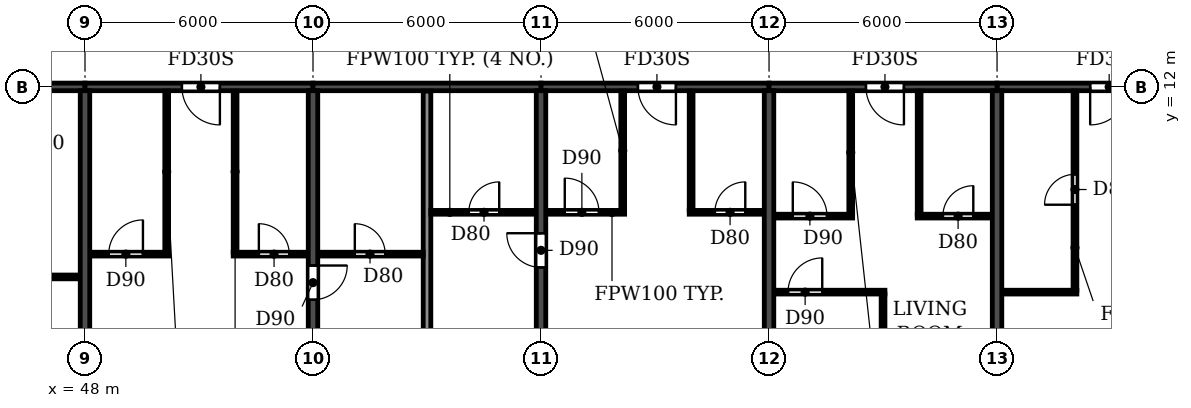
"""IFC4 building model, lengths in metres.
Left out: names, types, materials, properties, quantities, classifications, styles, units other than length and angle.
Written with IfcOpenShell. Run it as: python <this file> out.ifc"""

import sys

from ifc_helpers import new_model, si_unit, direction, frame, frame_2d, origin, place, context, subcontext, project, spatial, rectangle, extrude, element, fill, save


model = new_model("IFC4")
c1 = context("Model", 3, precision=1e-05, world=origin(), true_north=direction((0.0, 1.0)))
c2 = subcontext(c1, "Body", "Model", "MODEL_VIEW")
j1 = project(units=[si_unit("LENGTHUNIT", "METRE"), si_unit("PLANEANGLEUNIT", "RADIAN")], contexts=[c1])
p1 = place(None, origin())
s1 = spatial("IfcSite", under=j1, at=p1, CompositionType="ELEMENT")
p2 = place(p1, origin())
s2 = spatial("IfcBuilding", under=s1, at=p2, CompositionType="ELEMENT")
p3 = place(p2, frame((0.0, 0.0, 251.1)))
s3 = spatial("IfcBuildingStorey", under=s2, at=p3, CompositionType="ELEMENT", Elevation=251.1)
p4 = place(p3, frame((48.0, 0.2, 0.0), z_axis=(0.0, 0.0, 1.0), x_axis=(0.0, 1.0, 0.0)))
e1 = element("IfcWall", 1, at=p4, inside=s3, PredefinedType="SHEAR", context=c2, shape_type="SweptSolid", body=[
    extrude(rectangle(XDim=11.7, YDim=0.25, at=frame_2d((5.85, 0.0))), origin(), (0.0, 0.0, 1.0), 3.08),
])
p5 = place(p3, frame((54.0, 0.2, 0.0), z_axis=(0.0, 0.0, 1.0), x_axis=(0.0, 1.0, 0.0)))
e2 = element("IfcWall", 2, at=p5, inside=s3, PredefinedType="SHEAR", context=c2, shape_type="SweptSolid", body=[
    extrude(rectangle(XDim=11.7, YDim=0.25, at=frame_2d((5.85, 0.0))), origin(), (0.0, 0.0, 1.0), 3.08),
])
p6 = place(p5, frame((6.2, 0.0, 0.0)))
e3 = element("IfcOpeningElement", 3, at=p6, cuts=e2, PredefinedType="OPENING", context=c2, shape_type="SweptSolid", body=[
    extrude(rectangle(XDim=0.9, YDim=2.1, at=frame_2d((0.45, 1.05))), frame((0.0, 0.135, 0.0), z_axis=(0.0, -1.0, 0.0), x_axis=(1.0, 0.0, 0.0)), (0.0, 0.0, 1.0), 0.27),
])
p7 = place(p3, frame((60.0, 0.2, 0.0), z_axis=(0.0, 0.0, 1.0), x_axis=(0.0, 1.0, 0.0)))
e4 = element("IfcWall", 4, at=p7, inside=s3, PredefinedType="SHEAR", context=c2, shape_type="SweptSolid", body=[
    extrude(rectangle(XDim=11.7, YDim=0.25, at=frame_2d((5.85, 0.0))), origin(), (0.0, 0.0, 1.0), 3.08),
])
p8 = place(p7, frame((7.05, 0.0, 0.0)))
e5 = element("IfcOpeningElement", 5, at=p8, cuts=e4, PredefinedType="OPENING", context=c2, shape_type="SweptSolid", body=[
    extrude(rectangle(XDim=0.9, YDim=2.1, at=frame_2d((0.45, 1.05))), frame((0.0, 0.135, 0.0), z_axis=(0.0, -1.0, 0.0), x_axis=(1.0, 0.0, 0.0)), (0.0, 0.0, 1.0), 0.27),
])
for number, where, z_axis, x_axis in (
    (6, (66.0, 0.2, 0.0), (0.0, 0.0, 1.0), (0.0, 1.0, 0.0)),
    (7, (72.0, 0.2, 0.0), (0.0, 0.0, 1.0), (0.0, 1.0, 0.0)),
):
    element("IfcWall", number, at=place(p3, frame(where, z_axis=z_axis, x_axis=x_axis)), inside=s3, PredefinedType="SHEAR", context=c2, shape_type="SweptSolid", body=[
        extrude(rectangle(XDim=11.7, YDim=0.25, at=frame_2d((5.85, 0.0))), origin(), (0.0, 0.0, 1.0), 3.08),
    ])
p9 = place(p3, frame((42.0, 12.0, 0.0), z_axis=(0.0, 0.0, 1.0), x_axis=(1.0, 0.0, 0.0)))
e8 = element("IfcWall", 8, at=p9, inside=s3, PredefinedType="SHEAR", context=c2, shape_type="SweptSolid", body=[
    extrude(rectangle(XDim=6.0, YDim=0.2, at=frame_2d((3.0, 0.0))), origin(), (0.0, 0.0, 1.0), 2.48),
])
p10 = place(p9, frame((2.55, 0.0, 0.0)))
e9 = element("IfcOpeningElement", 9, at=p10, cuts=e8, PredefinedType="OPENING", context=c2, shape_type="SweptSolid", body=[
    extrude(rectangle(XDim=1.0, YDim=2.1, at=frame_2d((0.5, 1.05))), frame((0.0, 0.11, 0.0), z_axis=(0.0, -1.0, 0.0), x_axis=(1.0, 0.0, 0.0)), (0.0, 0.0, 1.0), 0.22),
])
p11 = place(p3, frame((48.0, 12.0, 0.0), z_axis=(0.0, 0.0, 1.0), x_axis=(1.0, 0.0, 0.0)))
e10 = element("IfcWall", 10, at=p11, inside=s3, PredefinedType="SHEAR", context=c2, shape_type="SweptSolid", body=[
    extrude(rectangle(XDim=6.0, YDim=0.2, at=frame_2d((3.0, 0.0))), origin(), (0.0, 0.0, 1.0), 2.48),
])
p12 = place(p11, frame((2.55, 0.0, 0.0)))
e11 = element("IfcOpeningElement", 11, at=p12, cuts=e10, PredefinedType="OPENING", context=c2, shape_type="SweptSolid", body=[
    extrude(rectangle(XDim=1.0, YDim=2.1, at=frame_2d((0.5, 1.05))), frame((0.0, 0.11, 0.0), z_axis=(0.0, -1.0, 0.0), x_axis=(1.0, 0.0, 0.0)), (0.0, 0.0, 1.0), 0.22),
])
p13 = place(p3, frame((54.0, 12.0, 0.0), z_axis=(0.0, 0.0, 1.0), x_axis=(1.0, 0.0, 0.0)))
e12 = element("IfcWall", 12, at=p13, inside=s3, PredefinedType="SHEAR", context=c2, shape_type="SweptSolid", body=[
    extrude(rectangle(XDim=6.0, YDim=0.2, at=frame_2d((3.0, 0.0))), origin(), (0.0, 0.0, 1.0), 2.48),
])
p14 = place(p3, frame((60.0, 12.0, 0.0), z_axis=(0.0, 0.0, 1.0), x_axis=(1.0, 0.0, 0.0)))
e13 = element("IfcWall", 13, at=p14, inside=s3, PredefinedType="SHEAR", context=c2, shape_type="SweptSolid", body=[
    extrude(rectangle(XDim=6.0, YDim=0.2, at=frame_2d((3.0, 0.0))), origin(), (0.0, 0.0, 1.0), 2.48),
])
p15 = place(p14, frame((2.55, 0.0, 0.0)))
e14 = element("IfcOpeningElement", 14, at=p15, cuts=e13, PredefinedType="OPENING", context=c2, shape_type="SweptSolid", body=[
    extrude(rectangle(XDim=1.0, YDim=2.1, at=frame_2d((0.5, 1.05))), frame((0.0, 0.11, 0.0), z_axis=(0.0, -1.0, 0.0), x_axis=(1.0, 0.0, 0.0)), (0.0, 0.0, 1.0), 0.22),
])
p16 = place(p3, frame((66.0, 12.0, 0.0), z_axis=(0.0, 0.0, 1.0), x_axis=(1.0, 0.0, 0.0)))
e15 = element("IfcWall", 15, at=p16, inside=s3, PredefinedType="SHEAR", context=c2, shape_type="SweptSolid", body=[
    extrude(rectangle(XDim=6.0, YDim=0.2, at=frame_2d((3.0, 0.0))), origin(), (0.0, 0.0, 1.0), 2.48),
])
p17 = place(p16, frame((2.55, 0.0, 0.0)))
e16 = element("IfcOpeningElement", 16, at=p17, cuts=e15, PredefinedType="OPENING", context=c2, shape_type="SweptSolid", body=[
    extrude(rectangle(XDim=1.0, YDim=2.1, at=frame_2d((0.5, 1.05))), frame((0.0, 0.11, 0.0), z_axis=(0.0, -1.0, 0.0), x_axis=(1.0, 0.0, 0.0)), (0.0, 0.0, 1.0), 0.22),
])
p18 = place(p3, frame((72.0, 12.0, 0.0), z_axis=(0.0, 0.0, 1.0), x_axis=(1.0, 0.0, 0.0)))
e17 = element("IfcWall", 17, at=p18, inside=s3, PredefinedType="SHEAR", context=c2, shape_type="SweptSolid", body=[
    extrude(rectangle(XDim=6.0, YDim=0.2, at=frame_2d((3.0, 0.0))), origin(), (0.0, 0.0, 1.0), 2.48),
])
p19 = place(p18, frame((2.45, 0.0, 0.0)))
e18 = element("IfcOpeningElement", 18, at=p19, cuts=e17, PredefinedType="OPENING", context=c2, shape_type="SweptSolid", body=[
    extrude(rectangle(XDim=1.0, YDim=2.1, at=frame_2d((0.5, 1.05))), frame((0.0, 0.11, 0.0), z_axis=(0.0, -1.0, 0.0), x_axis=(1.0, 0.0, 0.0)), (0.0, 0.0, 1.0), 0.22),
])
p20 = place(p3, frame((57.0, 0.06, 0.0), z_axis=(0.0, 0.0, 1.0), x_axis=(0.0, 1.0, 0.0)))
e19 = element("IfcWall", 19, at=p20, inside=s3, PredefinedType="PARTITIONING", context=c2, shape_type="SweptSolid", body=[
    extrude(rectangle(XDim=11.83, YDim=0.2, at=frame_2d((5.915, 0.0))), origin(), (0.0, 0.0, 1.0), 3.08),
])
p21 = place(p3, frame((66.135, 6.6, 0.0), z_axis=(0.0, 0.0, 1.0), x_axis=(1.0, 0.0, 0.0)))
e20 = element("IfcWall", 20, at=p21, inside=s3, PredefinedType="PARTITIONING", context=c2, shape_type="SweptSolid", body=[
    extrude(rectangle(XDim=2.915, YDim=0.1, at=frame_2d((1.458, 0.0))), origin(), (0.0, 0.0, 1.0), 3.08),
])
p22 = place(p21, frame((0.365, 0.0, 0.0)))
e21 = element("IfcOpeningElement", 21, at=p22, cuts=e20, PredefinedType="OPENING", context=c2, shape_type="SweptSolid", body=[
    extrude(rectangle(XDim=0.9, YDim=2.1, at=frame_2d((0.45, 1.05))), frame((0.0, 0.06, 0.0), z_axis=(0.0, -1.0, 0.0), x_axis=(1.0, 0.0, 0.0)), (0.0, 0.0, 1.0), 0.12),
])
for number, where, z_axis, x_axis in (
    (22, (72.135, 6.6, 0.0), (0.0, 0.0, 1.0), (1.0, 0.0, 0.0)),
    (23, (45.9, 7.0, 0.0), (0.0, 0.0, 1.0), (1.0, 0.0, 0.0)),
):
    element("IfcWall", number, at=place(p3, frame(where, z_axis=z_axis, x_axis=x_axis)), inside=s3, PredefinedType="PARTITIONING", context=c2, shape_type="SweptSolid", body=[
        extrude(rectangle(XDim=1.965, YDim=0.1, at=frame_2d((0.982, 0.0))), origin(), (0.0, 0.0, 1.0), 3.08),
    ])
p23 = place(p3, frame((48.135, 7.6, 0.0), z_axis=(0.0, 0.0, 1.0), x_axis=(1.0, 0.0, 0.0)))
e24 = element("IfcWall", 24, at=p23, inside=s3, PredefinedType="PARTITIONING", context=c2, shape_type="SweptSolid", body=[
    extrude(rectangle(XDim=2.065, YDim=0.1, at=frame_2d((1.032, 0.0))), origin(), (0.0, 0.0, 1.0), 3.08),
])
p24 = place(p23, frame((0.49, 0.0, 0.0)))
e25 = element("IfcOpeningElement", 25, at=p24, cuts=e24, PredefinedType="OPENING", context=c2, shape_type="SweptSolid", body=[
    extrude(rectangle(XDim=0.9, YDim=2.1, at=frame_2d((0.45, 1.05))), frame((0.0, 0.06, 0.0), z_axis=(0.0, -1.0, 0.0), x_axis=(1.0, 0.0, 0.0)), (0.0, 0.0, 1.0), 0.12),
])
p25 = place(p3, frame((51.9, 7.6, 0.0), z_axis=(0.0, 0.0, 1.0), x_axis=(1.0, 0.0, 0.0)))
e26 = element("IfcWall", 26, at=p25, inside=s3, PredefinedType="PARTITIONING", context=c2, shape_type="SweptSolid", body=[
    extrude(rectangle(XDim=1.965, YDim=0.1, at=frame_2d((0.982, 0.0))), origin(), (0.0, 0.0, 1.0), 3.08),
])
p26 = place(p25, frame((0.675, 0.0, 0.0)))
e27 = element("IfcOpeningElement", 27, at=p26, cuts=e26, PredefinedType="OPENING", context=c2, shape_type="SweptSolid", body=[
    extrude(rectangle(XDim=0.8, YDim=2.1, at=frame_2d((0.4, 1.05))), frame((0.0, 0.06, 0.0), z_axis=(0.0, -1.0, 0.0), x_axis=(1.0, 0.0, 0.0)), (0.0, 0.0, 1.0), 0.12),
])
p27 = place(p3, frame((54.135, 7.6, 0.0), z_axis=(0.0, 0.0, 1.0), x_axis=(1.0, 0.0, 0.0)))
e28 = element("IfcWall", 28, at=p27, inside=s3, PredefinedType="PARTITIONING", context=c2, shape_type="SweptSolid", body=[
    extrude(rectangle(XDim=2.765, YDim=0.1, at=frame_2d((1.382, 0.0))), origin(), (0.0, 0.0, 1.0), 3.08),
])
p28 = place(p27, frame((0.965, 0.0, 0.0)))
e29 = element("IfcOpeningElement", 29, at=p28, cuts=e28, PredefinedType="OPENING", context=c2, shape_type="SweptSolid", body=[
    extrude(rectangle(XDim=0.8, YDim=2.1, at=frame_2d((0.4, 1.05))), frame((0.0, 0.06, 0.0), z_axis=(0.0, -1.0, 0.0), x_axis=(1.0, 0.0, 0.0)), (0.0, 0.0, 1.0), 0.12),
])
p29 = place(p3, frame((66.135, 8.6, 0.0), z_axis=(0.0, 0.0, 1.0), x_axis=(1.0, 0.0, 0.0)))
e30 = element("IfcWall", 30, at=p29, inside=s3, PredefinedType="PARTITIONING", context=c2, shape_type="SweptSolid", body=[
    extrude(rectangle(XDim=2.065, YDim=0.1, at=frame_2d((1.032, 0.0))), origin(), (0.0, 0.0, 1.0), 3.08),
])
p30 = place(p29, frame((0.49, 0.0, 0.0)))
e31 = element("IfcOpeningElement", 31, at=p30, cuts=e30, PredefinedType="OPENING", context=c2, shape_type="SweptSolid", body=[
    extrude(rectangle(XDim=0.9, YDim=2.1, at=frame_2d((0.45, 1.05))), frame((0.0, 0.06, 0.0), z_axis=(0.0, -1.0, 0.0), x_axis=(1.0, 0.0, 0.0)), (0.0, 0.0, 1.0), 0.12),
])
p31 = place(p3, frame((69.9, 8.6, 0.0), z_axis=(0.0, 0.0, 1.0), x_axis=(1.0, 0.0, 0.0)))
e32 = element("IfcWall", 32, at=p31, inside=s3, PredefinedType="PARTITIONING", context=c2, shape_type="SweptSolid", body=[
    extrude(rectangle(XDim=1.965, YDim=0.1, at=frame_2d((0.982, 0.0))), origin(), (0.0, 0.0, 1.0), 3.08),
])
p32 = place(p31, frame((0.675, 0.0, 0.0)))
e33 = element("IfcOpeningElement", 33, at=p32, cuts=e32, PredefinedType="OPENING", context=c2, shape_type="SweptSolid", body=[
    extrude(rectangle(XDim=0.8, YDim=2.1, at=frame_2d((0.4, 1.05))), frame((0.0, 0.06, 0.0), z_axis=(0.0, -1.0, 0.0), x_axis=(1.0, 0.0, 0.0)), (0.0, 0.0, 1.0), 0.12),
])
p33 = place(p3, frame((57.1, 8.7, 0.0), z_axis=(0.0, 0.0, 1.0), x_axis=(1.0, 0.0, 0.0)))
e34 = element("IfcWall", 34, at=p33, inside=s3, PredefinedType="PARTITIONING", context=c2, shape_type="SweptSolid", body=[
    extrude(rectangle(XDim=2.765, YDim=0.1, at=frame_2d((1.382, 0.0))), origin(), (0.0, 0.0, 1.0), 3.08),
])
p34 = place(p33, frame((1.0, 0.0, 0.0)))
e35 = element("IfcOpeningElement", 35, at=p34, cuts=e34, PredefinedType="OPENING", context=c2, shape_type="SweptSolid", body=[
    extrude(rectangle(XDim=0.8, YDim=2.1, at=frame_2d((0.4, 1.05))), frame((0.0, 0.06, 0.0), z_axis=(0.0, -1.0, 0.0), x_axis=(1.0, 0.0, 0.0)), (0.0, 0.0, 1.0), 0.12),
])
p35 = place(p3, frame((60.135, 8.7, 0.0), z_axis=(0.0, 0.0, 1.0), x_axis=(1.0, 0.0, 0.0)))
e36 = element("IfcWall", 36, at=p35, inside=s3, PredefinedType="PARTITIONING", context=c2, shape_type="SweptSolid", body=[
    extrude(rectangle(XDim=2.065, YDim=0.1, at=frame_2d((1.032, 0.0))), origin(), (0.0, 0.0, 1.0), 3.08),
])
p36 = place(p35, frame((0.49, 0.0, 0.0)))
e37 = element("IfcOpeningElement", 37, at=p36, cuts=e36, PredefinedType="OPENING", context=c2, shape_type="SweptSolid", body=[
    extrude(rectangle(XDim=0.9, YDim=2.1, at=frame_2d((0.45, 1.05))), frame((0.0, 0.06, 0.0), z_axis=(0.0, -1.0, 0.0), x_axis=(1.0, 0.0, 0.0)), (0.0, 0.0, 1.0), 0.12),
])
p37 = place(p3, frame((63.9, 8.7, 0.0), z_axis=(0.0, 0.0, 1.0), x_axis=(1.0, 0.0, 0.0)))
e38 = element("IfcWall", 38, at=p37, inside=s3, PredefinedType="PARTITIONING", context=c2, shape_type="SweptSolid", body=[
    extrude(rectangle(XDim=1.965, YDim=0.1, at=frame_2d((0.982, 0.0))), origin(), (0.0, 0.0, 1.0), 3.08),
])
p38 = place(p37, frame((0.675, 0.0, 0.0)))
e39 = element("IfcOpeningElement", 39, at=p38, cuts=e38, PredefinedType="OPENING", context=c2, shape_type="SweptSolid", body=[
    extrude(rectangle(XDim=0.8, YDim=2.1, at=frame_2d((0.4, 1.05))), frame((0.0, 0.06, 0.0), z_axis=(0.0, -1.0, 0.0), x_axis=(1.0, 0.0, 0.0)), (0.0, 0.0, 1.0), 0.12),
])
for number, where, z_axis, x_axis in (
    (40, (50.15, 7.65, 0.0), (0.0, 0.0, 1.0), (0.0, 1.0, 0.0)),
    (41, (51.95, 7.65, 0.0), (0.0, 0.0, 1.0), (0.0, 1.0, 0.0)),
):
    element("IfcWall", number, at=place(p3, frame(where, z_axis=z_axis, x_axis=x_axis)), inside=s3, PredefinedType="PARTITIONING", context=c2, shape_type="SweptSolid", body=[
        extrude(rectangle(XDim=4.24, YDim=0.1, at=frame_2d((2.12, 0.0))), origin(), (0.0, 0.0, 1.0), 3.08),
    ])
for number, where, z_axis, x_axis in (
    (42, (62.15, 8.75, 0.0), (0.0, 0.0, 1.0), (0.0, 1.0, 0.0)),
    (43, (63.95, 8.75, 0.0), (0.0, 0.0, 1.0), (0.0, 1.0, 0.0)),
):
    element("IfcWall", number, at=place(p3, frame(where, z_axis=z_axis, x_axis=x_axis)), inside=s3, PredefinedType="PARTITIONING", context=c2, shape_type="SweptSolid", body=[
        extrude(rectangle(XDim=3.14, YDim=0.1, at=frame_2d((1.57, 0.0))), origin(), (0.0, 0.0, 1.0), 3.08),
    ])
p39 = place(p3, frame((68.15, 8.65, 0.0), z_axis=(0.0, 0.0, 1.0), x_axis=(0.0, 1.0, 0.0)))
e44 = element("IfcWall", 44, at=p39, inside=s3, PredefinedType="PARTITIONING", context=c2, shape_type="SweptSolid", body=[
    extrude(rectangle(XDim=3.24, YDim=0.1, at=frame_2d((1.62, 0.0))), origin(), (0.0, 0.0, 1.0), 3.08),
])
p40 = place(p3, frame((69.0, 0.06, 0.0), z_axis=(0.0, 0.0, 1.0), x_axis=(0.0, 1.0, 0.0)))
e45 = element("IfcWall", 45, at=p40, inside=s3, PredefinedType="PARTITIONING", context=c2, shape_type="SweptSolid", body=[
    extrude(rectangle(XDim=6.49, YDim=0.1, at=frame_2d((3.245, 0.0))), origin(), (0.0, 0.0, 1.0), 3.08),
])
p41 = place(p3, frame((69.95, 8.65, 0.0), z_axis=(0.0, 0.0, 1.0), x_axis=(0.0, 1.0, 0.0)))
e46 = element("IfcWall", 46, at=p41, inside=s3, PredefinedType="PARTITIONING", context=c2, shape_type="SweptSolid", body=[
    extrude(rectangle(XDim=3.24, YDim=0.1, at=frame_2d((1.62, 0.0))), origin(), (0.0, 0.0, 1.0), 3.08),
])
p42 = place(p3, frame((74.05, 6.65, 0.0), z_axis=(0.0, 0.0, 1.0), x_axis=(0.0, 1.0, 0.0)))
e47 = element("IfcWall", 47, at=p42, inside=s3, PredefinedType="PARTITIONING", context=c2, shape_type="SweptSolid", body=[
    extrude(rectangle(XDim=5.24, YDim=0.1, at=frame_2d((2.62, 0.0))), origin(), (0.0, 0.0, 1.0), 3.08),
])
p43 = place(p42, frame((2.25, 0.0, 0.0)))
e48 = element("IfcOpeningElement", 48, at=p43, cuts=e47, PredefinedType="OPENING", context=c2, shape_type="SweptSolid", body=[
    extrude(rectangle(XDim=0.8, YDim=2.1, at=frame_2d((0.4, 1.05))), frame((0.0, 0.06, 0.0), z_axis=(0.0, -1.0, 0.0), x_axis=(1.0, 0.0, 0.0)), (0.0, 0.0, 1.0), 0.12),
])
p44 = place(p28, origin())
e49 = element("IfcDoor", 49, at=p44, inside=s3, OperationType="SINGLE_SWING_LEFT", PredefinedType="DOOR", context=c2, shape_type="SweptSolid", body=[
    extrude(rectangle(XDim=0.8, YDim=2.1, at=frame_2d((0.4, 1.05))), frame((0.0, 0.025, 0.0), z_axis=(0.0, -1.0, 0.0), x_axis=(1.0, 0.0, 0.0)), (0.0, 0.0, 1.0), 0.05),
])
fill(e29, e49)
p45 = place(p24, origin())
e50 = element("IfcDoor", 50, at=p45, inside=s3, OperationType="SINGLE_SWING_RIGHT", PredefinedType="DOOR", context=c2, shape_type="SweptSolid", body=[
    extrude(rectangle(XDim=0.9, YDim=2.1, at=frame_2d((0.45, 1.05))), frame((0.0, 0.025, 0.0), z_axis=(0.0, -1.0, 0.0), x_axis=(1.0, 0.0, 0.0)), (0.0, 0.0, 1.0), 0.05),
])
fill(e25, e50)
p46 = place(p12, frame((1.0, 0.0, 0.0), z_axis=(0.0, 0.0, 1.0), x_axis=(-1.0, 0.0, 0.0)))
e51 = element("IfcDoor", 51, at=p46, inside=s3, OperationType="SINGLE_SWING_LEFT", PredefinedType="DOOR", context=c2, shape_type="SweptSolid", body=[
    extrude(rectangle(XDim=1.0, YDim=2.1, at=frame_2d((0.5, 1.05))), frame((0.0, 0.025, 0.0), z_axis=(0.0, -1.0, 0.0), x_axis=(1.0, 0.0, 0.0)), (0.0, 0.0, 1.0), 0.05),
])
fill(e11, e51)
p47 = place(p26, origin())
e52 = element("IfcDoor", 52, at=p47, inside=s3, OperationType="SINGLE_SWING_LEFT", PredefinedType="DOOR", context=c2, shape_type="SweptSolid", body=[
    extrude(rectangle(XDim=0.8, YDim=2.1, at=frame_2d((0.4, 1.05))), frame((0.0, 0.025, 0.0), z_axis=(0.0, -1.0, 0.0), x_axis=(1.0, 0.0, 0.0)), (0.0, 0.0, 1.0), 0.05),
])
fill(e27, e52)
p48 = place(p6, frame((0.9, 0.0, 0.0), z_axis=(0.0, 0.0, 1.0), x_axis=(-1.0, 0.0, 0.0)))
e53 = element("IfcDoor", 53, at=p48, inside=s3, OperationType="SINGLE_SWING_LEFT", PredefinedType="DOOR", context=c2, shape_type="SweptSolid", body=[
    extrude(rectangle(XDim=0.9, YDim=2.1, at=frame_2d((0.45, 1.05))), frame((0.0, 0.025, 0.0), z_axis=(0.0, -1.0, 0.0), x_axis=(1.0, 0.0, 0.0)), (0.0, 0.0, 1.0), 0.05),
])
fill(e3, e53)
p49 = place(p34, origin())
e54 = element("IfcDoor", 54, at=p49, inside=s3, OperationType="SINGLE_SWING_RIGHT", PredefinedType="DOOR", context=c2, shape_type="SweptSolid", body=[
    extrude(rectangle(XDim=0.8, YDim=2.1, at=frame_2d((0.4, 1.05))), frame((0.0, 0.025, 0.0), z_axis=(0.0, -1.0, 0.0), x_axis=(1.0, 0.0, 0.0)), (0.0, 0.0, 1.0), 0.05),
])
fill(e35, e54)
p50 = place(p8, origin())
e55 = element("IfcDoor", 55, at=p50, inside=s3, OperationType="SINGLE_SWING_RIGHT", PredefinedType="DOOR", context=c2, shape_type="SweptSolid", body=[
    extrude(rectangle(XDim=0.9, YDim=2.1, at=frame_2d((0.45, 1.05))), frame((0.0, 0.025, 0.0), z_axis=(0.0, -1.0, 0.0), x_axis=(1.0, 0.0, 0.0)), (0.0, 0.0, 1.0), 0.05),
])
fill(e5, e55)
p51 = place(p36, origin())
e56 = element("IfcDoor", 56, at=p51, inside=s3, OperationType="SINGLE_SWING_LEFT", PredefinedType="DOOR", context=c2, shape_type="SweptSolid", body=[
    extrude(rectangle(XDim=0.9, YDim=2.1, at=frame_2d((0.45, 1.05))), frame((0.0, 0.025, 0.0), z_axis=(0.0, -1.0, 0.0), x_axis=(1.0, 0.0, 0.0)), (0.0, 0.0, 1.0), 0.05),
])
fill(e37, e56)
p52 = place(p15, frame((1.0, 0.0, 0.0), z_axis=(0.0, 0.0, 1.0), x_axis=(-1.0, 0.0, 0.0)))
e57 = element("IfcDoor", 57, at=p52, inside=s3, OperationType="SINGLE_SWING_LEFT", PredefinedType="DOOR", context=c2, shape_type="SweptSolid", body=[
    extrude(rectangle(XDim=1.0, YDim=2.1, at=frame_2d((0.5, 1.05))), frame((0.0, 0.025, 0.0), z_axis=(0.0, -1.0, 0.0), x_axis=(1.0, 0.0, 0.0)), (0.0, 0.0, 1.0), 0.05),
])
fill(e14, e57)
p53 = place(p38, origin())
e58 = element("IfcDoor", 58, at=p53, inside=s3, OperationType="SINGLE_SWING_RIGHT", PredefinedType="DOOR", context=c2, shape_type="SweptSolid", body=[
    extrude(rectangle(XDim=0.8, YDim=2.1, at=frame_2d((0.4, 1.05))), frame((0.0, 0.025, 0.0), z_axis=(0.0, -1.0, 0.0), x_axis=(1.0, 0.0, 0.0)), (0.0, 0.0, 1.0), 0.05),
])
fill(e39, e58)
p54 = place(p22, origin())
e59 = element("IfcDoor", 59, at=p54, inside=s3, OperationType="SINGLE_SWING_RIGHT", PredefinedType="DOOR", context=c2, shape_type="SweptSolid", body=[
    extrude(rectangle(XDim=0.9, YDim=2.1, at=frame_2d((0.45, 1.05))), frame((0.0, 0.025, 0.0), z_axis=(0.0, -1.0, 0.0), x_axis=(1.0, 0.0, 0.0)), (0.0, 0.0, 1.0), 0.05),
])
fill(e21, e59)
p55 = place(p30, origin())
e60 = element("IfcDoor", 60, at=p55, inside=s3, OperationType="SINGLE_SWING_LEFT", PredefinedType="DOOR", context=c2, shape_type="SweptSolid", body=[
    extrude(rectangle(XDim=0.9, YDim=2.1, at=frame_2d((0.45, 1.05))), frame((0.0, 0.025, 0.0), z_axis=(0.0, -1.0, 0.0), x_axis=(1.0, 0.0, 0.0)), (0.0, 0.0, 1.0), 0.05),
])
fill(e31, e60)
p56 = place(p17, frame((1.0, 0.0, 0.0), z_axis=(0.0, 0.0, 1.0), x_axis=(-1.0, 0.0, 0.0)))
e61 = element("IfcDoor", 61, at=p56, inside=s3, OperationType="SINGLE_SWING_LEFT", PredefinedType="DOOR", context=c2, shape_type="SweptSolid", body=[
    extrude(rectangle(XDim=1.0, YDim=2.1, at=frame_2d((0.5, 1.05))), frame((0.0, 0.025, 0.0), z_axis=(0.0, -1.0, 0.0), x_axis=(1.0, 0.0, 0.0)), (0.0, 0.0, 1.0), 0.05),
])
fill(e16, e61)
p57 = place(p32, origin())
e62 = element("IfcDoor", 62, at=p57, inside=s3, OperationType="SINGLE_SWING_RIGHT", PredefinedType="DOOR", context=c2, shape_type="SweptSolid", body=[
    extrude(rectangle(XDim=0.8, YDim=2.1, at=frame_2d((0.4, 1.05))), frame((0.0, 0.025, 0.0), z_axis=(0.0, -1.0, 0.0), x_axis=(1.0, 0.0, 0.0)), (0.0, 0.0, 1.0), 0.05),
])
fill(e33, e62)
p58 = place(p43, origin())
e63 = element("IfcDoor", 63, at=p58, inside=s3, OperationType="SINGLE_SWING_LEFT", PredefinedType="DOOR", context=c2, shape_type="SweptSolid", body=[
    extrude(rectangle(XDim=0.8, YDim=2.1, at=frame_2d((0.4, 1.05))), frame((0.0, 0.025, 0.0), z_axis=(0.0, -1.0, 0.0), x_axis=(1.0, 0.0, 0.0)), (0.0, 0.0, 1.0), 0.05),
])
fill(e48, e63)
p59 = place(p19, frame((1.0, 0.0, 0.0), z_axis=(0.0, 0.0, 1.0), x_axis=(-1.0, 0.0, 0.0)))
e64 = element("IfcDoor", 64, at=p59, inside=s3, OperationType="SINGLE_SWING_RIGHT", PredefinedType="DOOR", context=c2, shape_type="SweptSolid", body=[
    extrude(rectangle(XDim=1.0, YDim=2.1, at=frame_2d((0.5, 1.05))), frame((0.0, 0.025, 0.0), z_axis=(0.0, -1.0, 0.0), x_axis=(1.0, 0.0, 0.0)), (0.0, 0.0, 1.0), 0.05),
])
fill(e18, e64)
save(model, sys.argv[1])
